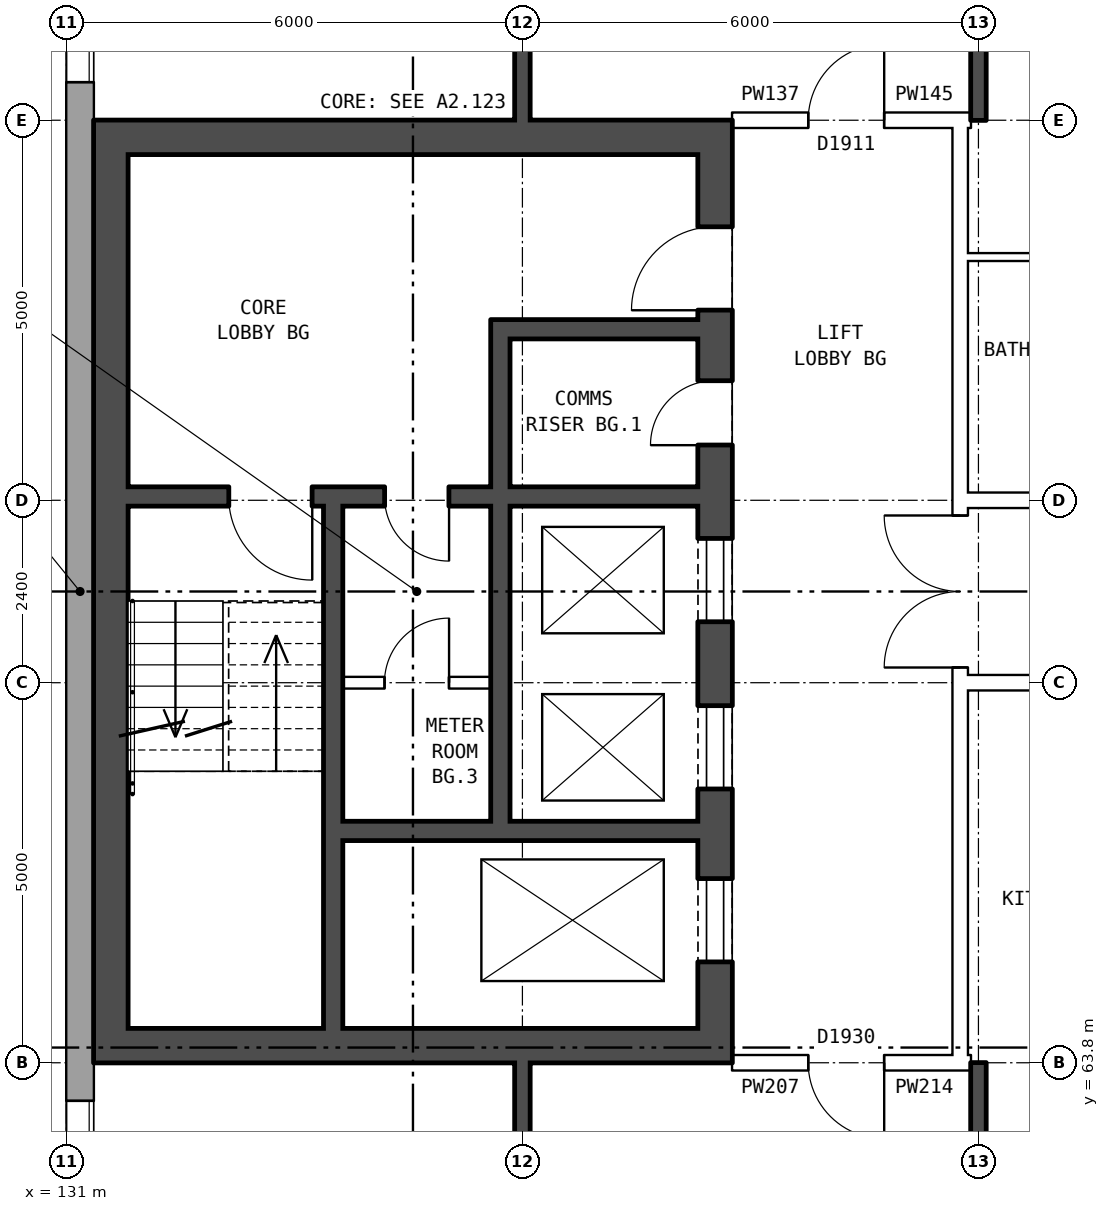
"""IFC4 building model, lengths in metres.
Left out: names, types, materials, properties, quantities, classifications, styles, units other than length and angle.
Written with IfcOpenShell. Run it as: python <this file> out.ifc"""

import sys

from ifc_helpers import new_model, si_unit, direction, frame, frame_2d, origin, place, context, subcontext, project, spatial, rectangle, extrude, element, fill, save


model = new_model("IFC4")
c1 = context("Model", 3, precision=1e-05, world=origin(), true_north=direction((0.0, 1.0)))
c2 = subcontext(c1, "Body", "Model", "MODEL_VIEW")
j1 = project(units=[si_unit("LENGTHUNIT", "METRE"), si_unit("PLANEANGLEUNIT", "RADIAN")], contexts=[c1])
p1 = place(None, origin())
s1 = spatial("IfcSite", under=j1, at=p1, CompositionType="ELEMENT")
p2 = place(p1, origin())
s2 = spatial("IfcBuilding", under=s1, at=p2, CompositionType="ELEMENT")
p3 = place(p2, frame((0.0, 0.0, 188.2)))
s3 = spatial("IfcBuildingStorey", under=s2, at=p3, CompositionType="ELEMENT", Elevation=188.2)
p4 = place(p3, frame((131.18, 82.925, 0.0), z_axis=(0.0, 0.0, 1.0), x_axis=(0.0, -1.0, 0.0)))
e1 = element("IfcWall", 1, at=p4, inside=s3, PredefinedType="STANDARD", context=c2, shape_type="SweptSolid", body=[
    extrude(rectangle(XDim=25.851, YDim=0.36, at=frame_2d((12.925, 0.0))), origin(), (0.0, 0.0, 1.0), 2.85),
])
p5 = place(p4, frame((1.975, 0.0, 1.7)))
e2 = element("IfcOpeningElement", 2, at=p5, cuts=e1, PredefinedType="OPENING", context=c2, shape_type="SweptSolid", body=[
    extrude(rectangle(XDim=1.0, YDim=0.9, at=frame_2d((0.5, 0.45))), frame((0.0, 0.19, 0.0), z_axis=(0.0, -1.0, 0.0), x_axis=(1.0, 0.0, 0.0)), (0.0, 0.0, 1.0), 0.38),
])
p6 = place(p4, frame((4.625, 0.0, 0.8)))
e3 = element("IfcOpeningElement", 3, at=p6, cuts=e1, PredefinedType="OPENING", context=c2, shape_type="SweptSolid", body=[
    extrude(rectangle(XDim=1.6, YDim=1.8, at=frame_2d((0.8, 0.9))), frame((0.0, 0.19, 0.0), z_axis=(0.0, -1.0, 0.0), x_axis=(1.0, 0.0, 0.0)), (0.0, 0.0, 1.0), 0.38),
])
p7 = place(p4, frame((19.625, 0.0, 0.8)))
e4 = element("IfcOpeningElement", 4, at=p7, cuts=e1, PredefinedType="OPENING", context=c2, shape_type="SweptSolid", body=[
    extrude(rectangle(XDim=1.6, YDim=1.8, at=frame_2d((0.8, 0.9))), frame((0.0, 0.19, 0.0), z_axis=(0.0, -1.0, 0.0), x_axis=(1.0, 0.0, 0.0)), (0.0, 0.0, 1.0), 0.38),
])
p8 = place(p4, frame((21.55, 0.0, 1.1)))
e5 = element("IfcOpeningElement", 5, at=p8, cuts=e1, PredefinedType="OPENING", context=c2, shape_type="SweptSolid", body=[
    extrude(rectangle(XDim=1.4, YDim=1.5, at=frame_2d((0.7, 0.75))), frame((0.0, 0.19, 0.0), z_axis=(0.0, -1.0, 0.0), x_axis=(1.0, 0.0, 0.0)), (0.0, 0.0, 1.0), 0.38),
])
p9 = place(p4, frame((3.325, 0.0, 0.8)))
e6 = element("IfcOpeningElement", 6, at=p9, cuts=e1, PredefinedType="OPENING", context=c2, shape_type="SweptSolid", body=[
    extrude(rectangle(XDim=1.0, YDim=1.8, at=frame_2d((0.5, 0.9))), frame((0.0, 0.19, 0.0), z_axis=(0.0, -1.0, 0.0), x_axis=(1.0, 0.0, 0.0)), (0.0, 0.0, 1.0), 0.38),
])
p10 = place(p4, frame((23.25, 0.0, 1.7)))
e7 = element("IfcOpeningElement", 7, at=p10, cuts=e1, PredefinedType="OPENING", context=c2, shape_type="SweptSolid", body=[
    extrude(rectangle(XDim=0.6, YDim=0.9, at=frame_2d((0.3, 0.45))), frame((0.0, 0.19, 0.0), z_axis=(0.0, -1.0, 0.0), x_axis=(1.0, 0.0, 0.0)), (0.0, 0.0, 1.0), 0.38),
])
p11 = place(p3, frame((139.535, 63.8, 0.0), z_axis=(0.0, 0.0, 1.0), x_axis=(0.0, 1.0, 0.0)))
e8 = element("IfcWall", 8, at=p11, inside=s3, PredefinedType="SHEAR", context=c2, shape_type="SweptSolid", body=[
    extrude(rectangle(XDim=12.4, YDim=0.45, at=frame_2d((6.2, 0.0))), origin(), (0.0, 0.0, 1.0), 2.85),
])
p12 = place(p11, frame((1.325, 0.0, 0.0)))
e9 = element("IfcOpeningElement", 9, at=p12, cuts=e8, PredefinedType="OPENING", context=c2, shape_type="SweptSolid", body=[
    extrude(rectangle(XDim=1.1, YDim=2.1, at=frame_2d((0.55, 1.05))), frame((0.0, 0.235, 0.0), z_axis=(0.0, -1.0, 0.0), x_axis=(1.0, 0.0, 0.0)), (0.0, 0.0, 1.0), 0.47),
])
p13 = place(p11, frame((3.6, 0.0, 0.0)))
e10 = element("IfcOpeningElement", 10, at=p13, cuts=e8, PredefinedType="OPENING", context=c2, shape_type="SweptSolid", body=[
    extrude(rectangle(XDim=1.1, YDim=2.1, at=frame_2d((0.55, 1.05))), frame((0.0, 0.235, 0.0), z_axis=(0.0, -1.0, 0.0), x_axis=(1.0, 0.0, 0.0)), (0.0, 0.0, 1.0), 0.47),
])
p14 = place(p11, frame((5.8, 0.0, 0.0)))
e11 = element("IfcOpeningElement", 11, at=p14, cuts=e8, PredefinedType="OPENING", context=c2, shape_type="SweptSolid", body=[
    extrude(rectangle(XDim=1.1, YDim=2.1, at=frame_2d((0.55, 1.05))), frame((0.0, 0.235, 0.0), z_axis=(0.0, -1.0, 0.0), x_axis=(1.0, 0.0, 0.0)), (0.0, 0.0, 1.0), 0.47),
])
p15 = place(p11, frame((9.9, 0.0, 0.0)))
e12 = element("IfcOpeningElement", 12, at=p15, cuts=e8, PredefinedType="OPENING", context=c2, shape_type="SweptSolid", body=[
    extrude(rectangle(XDim=1.1, YDim=2.1, at=frame_2d((0.55, 1.05))), frame((0.0, 0.235, 0.0), z_axis=(0.0, -1.0, 0.0), x_axis=(1.0, 0.0, 0.0)), (0.0, 0.0, 1.0), 0.47),
])
p16 = place(p11, frame((8.125, 0.0, 0.0)))
e13 = element("IfcOpeningElement", 13, at=p16, cuts=e8, PredefinedType="OPENING", context=c2, shape_type="SweptSolid", body=[
    extrude(rectangle(XDim=0.85, YDim=2.1, at=frame_2d((0.425, 1.05))), frame((0.0, 0.235, 0.0), z_axis=(0.0, -1.0, 0.0), x_axis=(1.0, 0.0, 0.0)), (0.0, 0.0, 1.0), 0.47),
])
p17 = place(p3, frame((131.585, 63.8, 0.0), z_axis=(0.0, 0.0, 1.0), x_axis=(0.0, 1.0, 0.0)))
e14 = element("IfcWall", 14, at=p17, inside=s3, PredefinedType="SHEAR", context=c2, shape_type="SweptSolid", body=[
    extrude(rectangle(XDim=12.4, YDim=0.45, at=frame_2d((6.2, 0.0))), origin(), (0.0, 0.0, 1.0), 2.85),
])
for number, where, z_axis, x_axis in (
    (15, (139.31, 64.025, 0.0), (0.0, 0.0, 1.0), (-1.0, 0.0, 0.0)),
    (16, (139.31, 75.975, 0.0), (0.0, 0.0, 1.0), (-1.0, 0.0, 0.0)),
):
    element("IfcWall", number, at=place(p3, frame(where, z_axis=z_axis, x_axis=x_axis)), inside=s3, PredefinedType="SHEAR", context=c2, shape_type="SweptSolid", body=[
        extrude(rectangle(XDim=7.5, YDim=0.45, at=frame_2d((3.75, 0.0))), origin(), (0.0, 0.0, 1.0), 2.85),
    ])
p18 = place(p3, frame((139.31, 66.85, 0.0), z_axis=(0.0, 0.0, 1.0), x_axis=(-1.0, 0.0, 0.0)))
e17 = element("IfcWall", 17, at=p18, inside=s3, PredefinedType="SHEAR", context=c2, shape_type="SweptSolid", body=[
    extrude(rectangle(XDim=4.675, YDim=0.25, at=frame_2d((2.337, 0.0))), origin(), (0.0, 0.0, 1.0), 2.85),
])
p19 = place(p3, frame((136.585, 68.8, 0.0), z_axis=(0.0, 0.0, 1.0), x_axis=(-1.0, 0.0, 0.0)))
e18 = element("IfcWall", 18, at=p19, inside=s3, PredefinedType="PARTITIONING", context=c2, shape_type="SweptSolid", body=[
    extrude(rectangle(XDim=1.95, YDim=0.15, at=frame_2d((0.975, 0.0))), origin(), (0.0, 0.0, 1.0), 2.85),
])
p20 = place(p19, frame((0.55, 0.0, 0.0)))
e19 = element("IfcOpeningElement", 19, at=p20, cuts=e18, PredefinedType="OPENING", context=c2, shape_type="SweptSolid", body=[
    extrude(rectangle(XDim=0.85, YDim=2.1, at=frame_2d((0.425, 1.05))), frame((0.0, 0.085, 0.0), z_axis=(0.0, -1.0, 0.0), x_axis=(1.0, 0.0, 0.0)), (0.0, 0.0, 1.0), 0.17),
])
p21 = place(p3, frame((139.31, 71.25, 0.0), z_axis=(0.0, 0.0, 1.0), x_axis=(-1.0, 0.0, 0.0)))
e20 = element("IfcWall", 20, at=p21, inside=s3, PredefinedType="SHEAR", context=c2, shape_type="SweptSolid", body=[
    extrude(rectangle(XDim=7.5, YDim=0.25, at=frame_2d((3.75, 0.0))), origin(), (0.0, 0.0, 1.0), 2.85),
])
p22 = place(p21, frame((5.075, 0.0, 0.0)))
e21 = element("IfcOpeningElement", 21, at=p22, cuts=e20, PredefinedType="OPENING", context=c2, shape_type="SweptSolid", body=[
    extrude(rectangle(XDim=1.1, YDim=2.1, at=frame_2d((0.55, 1.05))), frame((0.0, 0.135, 0.0), z_axis=(0.0, -1.0, 0.0), x_axis=(1.0, 0.0, 0.0)), (0.0, 0.0, 1.0), 0.27),
])
p23 = place(p21, frame((3.275, 0.0, 0.0)))
e22 = element("IfcOpeningElement", 22, at=p23, cuts=e20, PredefinedType="OPENING", context=c2, shape_type="SweptSolid", body=[
    extrude(rectangle(XDim=0.85, YDim=2.1, at=frame_2d((0.425, 1.05))), frame((0.0, 0.135, 0.0), z_axis=(0.0, -1.0, 0.0), x_axis=(1.0, 0.0, 0.0)), (0.0, 0.0, 1.0), 0.27),
])
p24 = place(p3, frame((139.31, 73.45, 0.0), z_axis=(0.0, 0.0, 1.0), x_axis=(-1.0, 0.0, 0.0)))
e23 = element("IfcWall", 23, at=p24, inside=s3, PredefinedType="SHEAR", context=c2, shape_type="SweptSolid", body=[
    extrude(rectangle(XDim=2.475, YDim=0.25, at=frame_2d((1.238, 0.0))), origin(), (0.0, 0.0, 1.0), 2.85),
])
p25 = place(p3, frame((136.71, 66.975, 0.0), z_axis=(0.0, 0.0, 1.0), x_axis=(0.0, 1.0, 0.0)))
e24 = element("IfcWall", 24, at=p25, inside=s3, PredefinedType="SHEAR", context=c2, shape_type="SweptSolid", body=[
    extrude(rectangle(XDim=4.15, YDim=0.25, at=frame_2d((2.075, 0.0))), origin(), (0.0, 0.0, 1.0), 2.85),
])
p26 = place(p3, frame((136.71, 71.375, 0.0), z_axis=(0.0, 0.0, 1.0), x_axis=(0.0, 1.0, 0.0)))
e25 = element("IfcWall", 25, at=p26, inside=s3, PredefinedType="SHEAR", context=c2, shape_type="SweptSolid", body=[
    extrude(rectangle(XDim=2.2, YDim=0.25, at=frame_2d((1.1, 0.0))), origin(), (0.0, 0.0, 1.0), 2.85),
])
p27 = place(p3, frame((134.51, 64.25, 0.0), z_axis=(0.0, 0.0, 1.0), x_axis=(0.0, 1.0, 0.0)))
e26 = element("IfcWall", 26, at=p27, inside=s3, PredefinedType="SHEAR", context=c2, shape_type="SweptSolid", body=[
    extrude(rectangle(XDim=6.875, YDim=0.25, at=frame_2d((3.438, 0.0))), origin(), (0.0, 0.0, 1.0), 2.85),
])
p28 = place(p3, frame((142.76, 63.9, 0.0), z_axis=(0.0, 0.0, 1.0), x_axis=(0.0, 1.0, 0.0)))
e27 = element("IfcWall", 27, at=p28, inside=s3, PredefinedType="PARTITIONING", context=c2, shape_type="SweptSolid", body=[
    extrude(rectangle(XDim=12.2, YDim=0.2, at=frame_2d((6.1, 0.0))), origin(), (0.0, 0.0, 1.0), 2.85),
])
p29 = place(p28, frame((5.1, 0.0, 0.0)))
e28 = element("IfcOpeningElement", 28, at=p29, cuts=e27, PredefinedType="OPENING", context=c2, shape_type="SweptSolid", body=[
    extrude(rectangle(XDim=2.0, YDim=2.1, at=frame_2d((1.0, 1.05))), frame((0.0, 0.11, 0.0), z_axis=(0.0, -1.0, 0.0), x_axis=(1.0, 0.0, 0.0)), (0.0, 0.0, 1.0), 0.22),
])
p30 = place(p3, frame((139.76, 63.8, 0.0), z_axis=(0.0, 0.0, 1.0), x_axis=(1.0, 0.0, 0.0)))
e29 = element("IfcWall", 29, at=p30, inside=s3, PredefinedType="PARTITIONING", context=c2, shape_type="SweptSolid", body=[
    extrude(rectangle(XDim=3.0, YDim=0.2, at=frame_2d((1.5, 0.0))), origin(), (0.0, 0.0, 1.0), 2.85),
])
p31 = place(p30, frame((1.0, 0.0, 0.0)))
e30 = element("IfcOpeningElement", 30, at=p31, cuts=e29, PredefinedType="OPENING", context=c2, shape_type="SweptSolid", body=[
    extrude(rectangle(XDim=1.0, YDim=2.1, at=frame_2d((0.5, 1.05))), frame((0.0, 0.11, 0.0), z_axis=(0.0, -1.0, 0.0), x_axis=(1.0, 0.0, 0.0)), (0.0, 0.0, 1.0), 0.22),
])
p32 = place(p3, frame((142.76, 63.8, 0.0), z_axis=(0.0, 0.0, 1.0), x_axis=(1.0, 0.0, 0.0)))
e31 = element("IfcWall", 31, at=p32, inside=s3, PredefinedType="PARTITIONING", context=c2, shape_type="SweptSolid", body=[
    extrude(rectangle(XDim=0.14, YDim=0.2, at=frame_2d((0.07, 0.0))), origin(), (0.0, 0.0, 1.0), 2.85),
])
p33 = place(p3, frame((142.76, 68.8, 0.0), z_axis=(0.0, 0.0, 1.0), x_axis=(1.0, 0.0, 0.0)))
e32 = element("IfcWall", 32, at=p33, inside=s3, PredefinedType="PARTITIONING", context=c2, shape_type="SweptSolid", body=[
    extrude(rectangle(XDim=14.48, YDim=0.2, at=frame_2d((7.24, 0.0))), origin(), (0.0, 0.0, 1.0), 2.85),
])
p34 = place(p33, frame((1.12, 0.0, 0.0)))
e33 = element("IfcOpeningElement", 33, at=p34, cuts=e32, PredefinedType="OPENING", context=c2, shape_type="SweptSolid", body=[
    extrude(rectangle(XDim=1.0, YDim=2.1, at=frame_2d((0.5, 1.05))), frame((0.0, 0.11, 0.0), z_axis=(0.0, -1.0, 0.0), x_axis=(1.0, 0.0, 0.0)), (0.0, 0.0, 1.0), 0.22),
])
p35 = place(p33, frame((7.24, 0.0, 0.0)))
e34 = element("IfcOpeningElement", 34, at=p35, cuts=e32, PredefinedType="OPENING", context=c2, shape_type="SweptSolid", body=[
    extrude(rectangle(XDim=1.0, YDim=2.1, at=frame_2d((0.5, 1.05))), frame((0.0, 0.11, 0.0), z_axis=(0.0, -1.0, 0.0), x_axis=(1.0, 0.0, 0.0)), (0.0, 0.0, 1.0), 0.22),
])
p36 = place(p3, frame((142.76, 71.2, 0.0), z_axis=(0.0, 0.0, 1.0), x_axis=(1.0, 0.0, 0.0)))
e35 = element("IfcWall", 35, at=p36, inside=s3, PredefinedType="PARTITIONING", context=c2, shape_type="SweptSolid", body=[
    extrude(rectangle(XDim=14.48, YDim=0.2, at=frame_2d((7.24, 0.0))), origin(), (0.0, 0.0, 1.0), 2.85),
])
p37 = place(p36, frame((4.24, 0.0, 0.0)))
e36 = element("IfcOpeningElement", 36, at=p37, cuts=e35, PredefinedType="OPENING", context=c2, shape_type="SweptSolid", body=[
    extrude(rectangle(XDim=1.0, YDim=2.1, at=frame_2d((0.5, 1.05))), frame((0.0, 0.11, 0.0), z_axis=(0.0, -1.0, 0.0), x_axis=(1.0, 0.0, 0.0)), (0.0, 0.0, 1.0), 0.22),
])
p38 = place(p36, frame((7.24, 0.0, 0.0)))
e37 = element("IfcOpeningElement", 37, at=p38, cuts=e35, PredefinedType="OPENING", context=c2, shape_type="SweptSolid", body=[
    extrude(rectangle(XDim=1.0, YDim=2.1, at=frame_2d((0.5, 1.05))), frame((0.0, 0.11, 0.0), z_axis=(0.0, -1.0, 0.0), x_axis=(1.0, 0.0, 0.0)), (0.0, 0.0, 1.0), 0.22),
])
p39 = place(p3, frame((142.76, 74.4, 0.0), z_axis=(0.0, 0.0, 1.0), x_axis=(1.0, 0.0, 0.0)))
e38 = element("IfcWall", 38, at=p39, inside=s3, PredefinedType="PARTITIONING", context=c2, shape_type="SweptSolid", body=[
    extrude(rectangle(XDim=3.24, YDim=0.1, at=frame_2d((1.62, 0.0))), origin(), (0.0, 0.0, 1.0), 2.85),
])
p40 = place(p3, frame((139.76, 76.2, 0.0), z_axis=(0.0, 0.0, 1.0), x_axis=(1.0, 0.0, 0.0)))
e39 = element("IfcWall", 39, at=p40, inside=s3, PredefinedType="PARTITIONING", context=c2, shape_type="SweptSolid", body=[
    extrude(rectangle(XDim=3.0, YDim=0.2, at=frame_2d((1.5, 0.0))), origin(), (0.0, 0.0, 1.0), 2.85),
])
p41 = place(p40, frame((1.0, 0.0, 0.0)))
e40 = element("IfcOpeningElement", 40, at=p41, cuts=e39, PredefinedType="OPENING", context=c2, shape_type="SweptSolid", body=[
    extrude(rectangle(XDim=1.0, YDim=2.1, at=frame_2d((0.5, 1.05))), frame((0.0, 0.11, 0.0), z_axis=(0.0, -1.0, 0.0), x_axis=(1.0, 0.0, 0.0)), (0.0, 0.0, 1.0), 0.22),
])
p42 = place(p3, frame((142.76, 76.2, 0.0), z_axis=(0.0, 0.0, 1.0), x_axis=(1.0, 0.0, 0.0)))
e41 = element("IfcWall", 41, at=p42, inside=s3, PredefinedType="PARTITIONING", context=c2, shape_type="SweptSolid", body=[
    extrude(rectangle(XDim=0.14, YDim=0.2, at=frame_2d((0.07, 0.0))), origin(), (0.0, 0.0, 1.0), 2.85),
])
p43 = place(p3, frame((137.0, 54.36, 0.0), z_axis=(0.0, 0.0, 1.0), x_axis=(0.0, 1.0, 0.0)))
e42 = element("IfcWall", 42, at=p43, inside=s3, PredefinedType="SOLIDWALL", context=c2, shape_type="SweptSolid", body=[
    extrude(rectangle(XDim=9.44, YDim=0.2, at=frame_2d((4.72, 0.0))), origin(), (0.0, 0.0, 1.0), 2.85),
])
p44 = place(p43, frame((7.04, 0.0, 0.0)))
e43 = element("IfcOpeningElement", 43, at=p44, cuts=e42, PredefinedType="OPENING", context=c2, shape_type="SweptSolid", body=[
    extrude(rectangle(XDim=0.9, YDim=2.1, at=frame_2d((0.45, 1.05))), frame((0.0, 0.11, 0.0), z_axis=(0.0, -1.0, 0.0), x_axis=(1.0, 0.0, 0.0)), (0.0, 0.0, 1.0), 0.22),
])
p45 = place(p3, frame((137.0, 76.2, 0.0), z_axis=(0.0, 0.0, 1.0), x_axis=(0.0, 1.0, 0.0)))
e44 = element("IfcWall", 44, at=p45, inside=s3, PredefinedType="SOLIDWALL", context=c2, shape_type="SweptSolid", body=[
    extrude(rectangle(XDim=9.44, YDim=0.2, at=frame_2d((4.72, 0.0))), origin(), (0.0, 0.0, 1.0), 2.85),
])
p46 = place(p45, frame((1.5, 0.0, 0.0)))
e45 = element("IfcOpeningElement", 45, at=p46, cuts=e44, PredefinedType="OPENING", context=c2, shape_type="SweptSolid", body=[
    extrude(rectangle(XDim=0.9, YDim=2.1, at=frame_2d((0.45, 1.05))), frame((0.0, 0.11, 0.0), z_axis=(0.0, -1.0, 0.0), x_axis=(1.0, 0.0, 0.0)), (0.0, 0.0, 1.0), 0.22),
])
for number, where, z_axis, x_axis in (
    (46, (143.0, 54.36, 0.0), (0.0, 0.0, 1.0), (0.0, 1.0, 0.0)),
    (47, (143.0, 76.2, 0.0), (0.0, 0.0, 1.0), (0.0, 1.0, 0.0)),
):
    element("IfcWall", number, at=place(p3, frame(where, z_axis=z_axis, x_axis=x_axis)), inside=s3, PredefinedType="SOLIDWALL", context=c2, shape_type="SweptSolid", body=[
        extrude(rectangle(XDim=9.44, YDim=0.2, at=frame_2d((4.72, 0.0))), origin(), (0.0, 0.0, 1.0), 2.85),
    ])
p47 = place(p6, origin())
e48 = element("IfcWindow", 48, at=p47, inside=s3, PartitioningType="SINGLE_PANEL", PredefinedType="WINDOW", context=c2, shape_type="SweptSolid", body=[
    extrude(rectangle(XDim=1.6, YDim=1.8, at=frame_2d((0.8, 0.9))), frame((0.0, 0.15, 0.0), z_axis=(0.0, -1.0, 0.0), x_axis=(1.0, 0.0, 0.0)), (0.0, 0.0, 1.0), 0.06),
])
fill(e3, e48)
p48 = place(p7, origin())
e49 = element("IfcWindow", 49, at=p48, inside=s3, PartitioningType="SINGLE_PANEL", PredefinedType="WINDOW", context=c2, shape_type="SweptSolid", body=[
    extrude(rectangle(XDim=1.6, YDim=1.8, at=frame_2d((0.8, 0.9))), frame((0.0, 0.15, 0.0), z_axis=(0.0, -1.0, 0.0), x_axis=(1.0, 0.0, 0.0)), (0.0, 0.0, 1.0), 0.06),
])
fill(e4, e49)
p49 = place(p12, origin())
e50 = element("IfcDoor", 50, at=p49, inside=s3, OperationType="DOUBLE_DOOR_SLIDING", PredefinedType="DOOR", context=c2, shape_type="SweptSolid", body=[
    extrude(rectangle(XDim=1.1, YDim=2.1, at=frame_2d((0.55, 1.05))), frame((0.0, 0.21, 0.0), z_axis=(0.0, -1.0, 0.0), x_axis=(1.0, 0.0, 0.0)), (0.0, 0.0, 1.0), 0.05),
])
fill(e9, e50)
p50 = place(p13, origin())
e51 = element("IfcDoor", 51, at=p50, inside=s3, OperationType="DOUBLE_DOOR_SLIDING", PredefinedType="DOOR", context=c2, shape_type="SweptSolid", body=[
    extrude(rectangle(XDim=1.1, YDim=2.1, at=frame_2d((0.55, 1.05))), frame((0.0, 0.21, 0.0), z_axis=(0.0, -1.0, 0.0), x_axis=(1.0, 0.0, 0.0)), (0.0, 0.0, 1.0), 0.05),
])
fill(e10, e51)
p51 = place(p14, origin())
e52 = element("IfcDoor", 52, at=p51, inside=s3, OperationType="DOUBLE_DOOR_SLIDING", PredefinedType="DOOR", context=c2, shape_type="SweptSolid", body=[
    extrude(rectangle(XDim=1.1, YDim=2.1, at=frame_2d((0.55, 1.05))), frame((0.0, 0.21, 0.0), z_axis=(0.0, -1.0, 0.0), x_axis=(1.0, 0.0, 0.0)), (0.0, 0.0, 1.0), 0.05),
])
fill(e11, e52)
p52 = place(p15, origin())
e53 = element("IfcDoor", 53, at=p52, inside=s3, OperationType="SINGLE_SWING_LEFT", PredefinedType="DOOR", context=c2, shape_type="SweptSolid", body=[
    extrude(rectangle(XDim=1.1, YDim=2.1, at=frame_2d((0.55, 1.05))), frame((0.0, 0.21, 0.0), z_axis=(0.0, -1.0, 0.0), x_axis=(1.0, 0.0, 0.0)), (0.0, 0.0, 1.0), 0.05),
])
fill(e12, e53)
p53 = place(p22, origin())
e54 = element("IfcDoor", 54, at=p53, inside=s3, OperationType="SINGLE_SWING_LEFT", PredefinedType="DOOR", context=c2, shape_type="SweptSolid", body=[
    extrude(rectangle(XDim=1.1, YDim=2.1, at=frame_2d((0.55, 1.05))), frame((0.0, 0.025, 0.0), z_axis=(0.0, -1.0, 0.0), x_axis=(1.0, 0.0, 0.0)), (0.0, 0.0, 1.0), 0.05),
])
fill(e21, e54)
p54 = place(p16, origin())
e55 = element("IfcDoor", 55, at=p54, inside=s3, OperationType="SINGLE_SWING_LEFT", PredefinedType="DOOR", context=c2, shape_type="SweptSolid", body=[
    extrude(rectangle(XDim=0.85, YDim=2.1, at=frame_2d((0.425, 1.05))), frame((0.0, 0.21, 0.0), z_axis=(0.0, -1.0, 0.0), x_axis=(1.0, 0.0, 0.0)), (0.0, 0.0, 1.0), 0.05),
])
fill(e13, e55)
p55 = place(p23, origin())
e56 = element("IfcDoor", 56, at=p55, inside=s3, OperationType="SINGLE_SWING_LEFT", PredefinedType="DOOR", context=c2, shape_type="SweptSolid", body=[
    extrude(rectangle(XDim=0.85, YDim=2.1, at=frame_2d((0.425, 1.05))), frame((0.0, 0.025, 0.0), z_axis=(0.0, -1.0, 0.0), x_axis=(1.0, 0.0, 0.0)), (0.0, 0.0, 1.0), 0.05),
])
fill(e22, e56)
p56 = place(p20, frame((0.85, 0.0, 0.0), z_axis=(0.0, 0.0, 1.0), x_axis=(-1.0, 0.0, 0.0)))
e57 = element("IfcDoor", 57, at=p56, inside=s3, OperationType="SINGLE_SWING_RIGHT", PredefinedType="DOOR", context=c2, shape_type="SweptSolid", body=[
    extrude(rectangle(XDim=0.85, YDim=2.1, at=frame_2d((0.425, 1.05))), frame((0.0, 0.025, 0.0), z_axis=(0.0, -1.0, 0.0), x_axis=(1.0, 0.0, 0.0)), (0.0, 0.0, 1.0), 0.05),
])
fill(e19, e57)
p57 = place(p29, origin())
e58 = element("IfcDoor", 58, at=p57, inside=s3, OperationType="DOUBLE_DOOR_SINGLE_SWING", PredefinedType="DOOR", context=c2, shape_type="SweptSolid", body=[
    extrude(rectangle(XDim=2.0, YDim=2.1, at=frame_2d((1.0, 1.05))), frame((0.0, 0.025, 0.0), z_axis=(0.0, -1.0, 0.0), x_axis=(1.0, 0.0, 0.0)), (0.0, 0.0, 1.0), 0.05),
])
fill(e28, e58)
p58 = place(p31, frame((1.0, 0.0, 0.0), z_axis=(0.0, 0.0, 1.0), x_axis=(-1.0, 0.0, 0.0)))
e59 = element("IfcDoor", 59, at=p58, inside=s3, OperationType="SINGLE_SWING_LEFT", PredefinedType="DOOR", context=c2, shape_type="SweptSolid", body=[
    extrude(rectangle(XDim=1.0, YDim=2.1, at=frame_2d((0.5, 1.05))), frame((0.0, 0.025, 0.0), z_axis=(0.0, -1.0, 0.0), x_axis=(1.0, 0.0, 0.0)), (0.0, 0.0, 1.0), 0.05),
])
fill(e30, e59)
p59 = place(p41, origin())
e60 = element("IfcDoor", 60, at=p59, inside=s3, OperationType="SINGLE_SWING_RIGHT", PredefinedType="DOOR", context=c2, shape_type="SweptSolid", body=[
    extrude(rectangle(XDim=1.0, YDim=2.1, at=frame_2d((0.5, 1.05))), frame((0.0, 0.025, 0.0), z_axis=(0.0, -1.0, 0.0), x_axis=(1.0, 0.0, 0.0)), (0.0, 0.0, 1.0), 0.05),
])
fill(e40, e60)
save(model, sys.argv[1])
